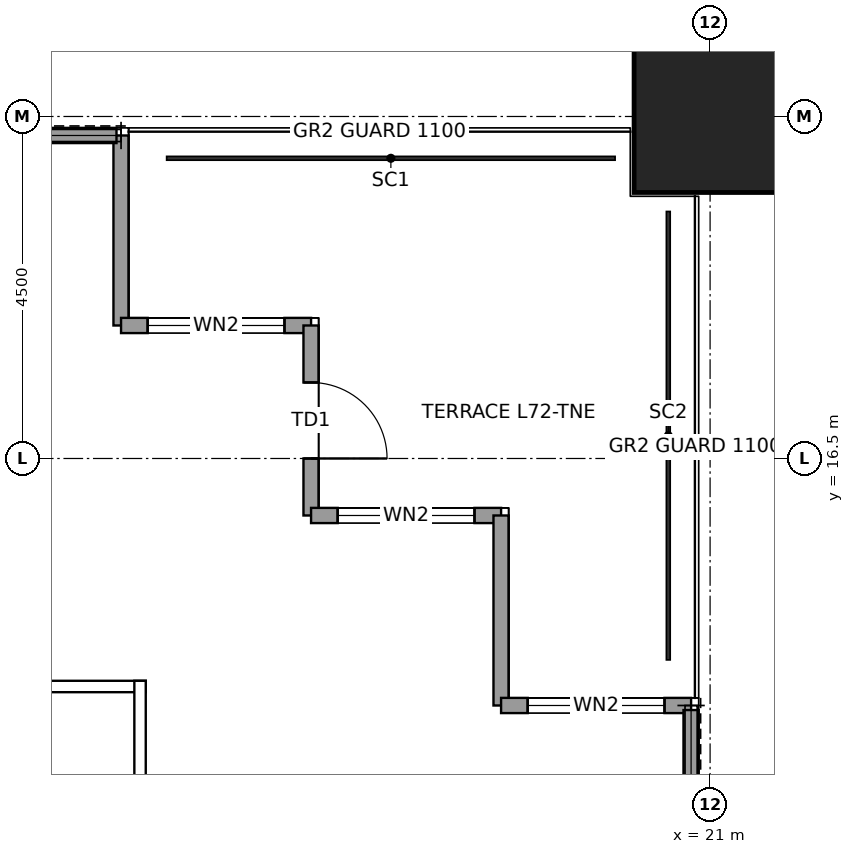
"""IFC4 building model, lengths in metres.
Left out: names, types, materials, properties, quantities, classifications, styles, units other than length and angle.
Written with IfcOpenShell. Run it as: python <this file> out.ifc"""

import sys

from ifc_helpers import new_model, si_unit, direction, frame, frame_2d, origin, origin_2d, place, context, subcontext, project, spatial, rectangle, hollow_rectangle, extrude, element, fill, save


model = new_model("IFC4")
c1 = context("Model", 3, precision=1e-05, world=origin(), true_north=direction((0.0, 1.0)))
c2 = subcontext(c1, "Body", "Model", "MODEL_VIEW")
j1 = project(units=[si_unit("LENGTHUNIT", "METRE"), si_unit("PLANEANGLEUNIT", "RADIAN")], contexts=[c1])
p1 = place(None, origin())
s1 = spatial("IfcSite", under=j1, at=p1, CompositionType="ELEMENT")
p2 = place(p1, origin())
s2 = spatial("IfcBuilding", under=s1, at=p2, CompositionType="ELEMENT")
p3 = place(p2, frame((0.0, 0.0, 323.9)))
s3 = spatial("IfcBuildingStorey", under=s2, at=p3, CompositionType="ELEMENT", Elevation=323.9)
p4 = place(p3, frame((21.0, 21.0, 0.0), z_axis=(0.0, 0.0, 1.0), x_axis=(1.0, 0.0, 0.0)))
e1 = element("IfcColumn", 1, at=p4, inside=s3, PredefinedType="COLUMN", context=c2, shape_type="SweptSolid", body=[
    extrude(hollow_rectangle(XDim=2.0, YDim=2.0, WallThickness=0.095, at=origin_2d()), origin(), (0.0, 0.0, 1.0), 4.0),
])
p5 = place(p3, frame((13.25, 20.75, 0.0), z_axis=(0.0, 0.0, 1.0), x_axis=(0.0, -1.0, 0.0)))
e2 = element("IfcWall", 2, at=p5, inside=s3, PredefinedType="SOLIDWALL", context=c2, shape_type="SweptSolid", body=[
    extrude(rectangle(XDim=2.5, YDim=0.2, at=frame_2d((1.25, 0.0))), origin(), (0.0, 0.0, 1.0), 3.85),
])
p6 = place(p3, frame((13.25, 18.25, 0.0), z_axis=(0.0, 0.0, 1.0), x_axis=(1.0, 0.0, 0.0)))
e3 = element("IfcWall", 3, at=p6, inside=s3, PredefinedType="SOLIDWALL", context=c2, shape_type="SweptSolid", body=[
    extrude(rectangle(XDim=2.5, YDim=0.2, at=frame_2d((1.25, 0.0))), origin(), (0.0, 0.0, 1.0), 3.85),
])
p7 = place(p6, frame((0.35, 0.0, 0.3)))
e4 = element("IfcOpeningElement", 4, at=p7, cuts=e3, PredefinedType="OPENING", context=c2, shape_type="SweptSolid", body=[
    extrude(rectangle(XDim=1.8, YDim=2.4, at=frame_2d((0.9, 1.2))), frame((0.0, 0.11, 0.0), z_axis=(0.0, -1.0, 0.0), x_axis=(1.0, 0.0, 0.0)), (0.0, 0.0, 1.0), 0.22),
])
p8 = place(p3, frame((15.75, 18.25, 0.0), z_axis=(0.0, 0.0, 1.0), x_axis=(0.0, -1.0, 0.0)))
e5 = element("IfcWall", 5, at=p8, inside=s3, PredefinedType="SOLIDWALL", context=c2, shape_type="SweptSolid", body=[
    extrude(rectangle(XDim=2.5, YDim=0.2, at=frame_2d((1.25, 0.0))), origin(), (0.0, 0.0, 1.0), 3.317),
])
p9 = place(p8, frame((0.75, 0.0, 0.0)))
e6 = element("IfcOpeningElement", 6, at=p9, cuts=e5, PredefinedType="OPENING", context=c2, shape_type="SweptSolid", body=[
    extrude(rectangle(XDim=1.0, YDim=2.4, at=frame_2d((0.5, 1.2))), frame((0.0, 0.11, 0.0), z_axis=(0.0, -1.0, 0.0), x_axis=(1.0, 0.0, 0.0)), (0.0, 0.0, 1.0), 0.22),
])
p10 = place(p3, frame((15.75, 15.75, 0.0), z_axis=(0.0, 0.0, 1.0), x_axis=(1.0, 0.0, 0.0)))
e7 = element("IfcWall", 7, at=p10, inside=s3, PredefinedType="SOLIDWALL", context=c2, shape_type="SweptSolid", body=[
    extrude(rectangle(XDim=2.5, YDim=0.2, at=frame_2d((1.25, 0.0))), origin(), (0.0, 0.0, 1.0), 3.85),
])
p11 = place(p10, frame((0.35, 0.0, 0.3)))
e8 = element("IfcOpeningElement", 8, at=p11, cuts=e7, PredefinedType="OPENING", context=c2, shape_type="SweptSolid", body=[
    extrude(rectangle(XDim=1.8, YDim=2.4, at=frame_2d((0.9, 1.2))), frame((0.0, 0.11, 0.0), z_axis=(0.0, -1.0, 0.0), x_axis=(1.0, 0.0, 0.0)), (0.0, 0.0, 1.0), 0.22),
])
p12 = place(p3, frame((18.25, 15.75, 0.0), z_axis=(0.0, 0.0, 1.0), x_axis=(0.0, -1.0, 0.0)))
e9 = element("IfcWall", 9, at=p12, inside=s3, PredefinedType="SOLIDWALL", context=c2, shape_type="SweptSolid", body=[
    extrude(rectangle(XDim=2.5, YDim=0.2, at=frame_2d((1.25, 0.0))), origin(), (0.0, 0.0, 1.0), 3.85),
])
p13 = place(p3, frame((18.25, 13.25, 0.0), z_axis=(0.0, 0.0, 1.0), x_axis=(1.0, 0.0, 0.0)))
e10 = element("IfcWall", 10, at=p13, inside=s3, PredefinedType="SOLIDWALL", context=c2, shape_type="SweptSolid", body=[
    extrude(rectangle(XDim=2.5, YDim=0.2, at=frame_2d((1.25, 0.0))), origin(), (0.0, 0.0, 1.0), 3.85),
])
p14 = place(p13, frame((0.35, 0.0, 0.3)))
e11 = element("IfcOpeningElement", 11, at=p14, cuts=e10, PredefinedType="OPENING", context=c2, shape_type="SweptSolid", body=[
    extrude(rectangle(XDim=1.8, YDim=2.4, at=frame_2d((0.9, 1.2))), frame((0.0, 0.11, 0.0), z_axis=(0.0, -1.0, 0.0), x_axis=(1.0, 0.0, 0.0)), (0.0, 0.0, 1.0), 0.22),
])
for number, where, z_axis, x_axis in (
    (12, (10.405, 20.75, 0.0), (0.0, 0.0, 1.0), (1.0, 0.0, 0.0)),
    (13, (20.75, 13.19, 0.0), (0.0, 0.0, 1.0), (0.0, -1.0, 0.0)),
):
    element("IfcWall", number, at=place(p3, frame(where, z_axis=z_axis, x_axis=x_axis)), inside=s3, PredefinedType="SOLIDWALL", context=c2, shape_type="SweptSolid", body=[
        extrude(rectangle(XDim=2.785, YDim=0.2, at=frame_2d((1.393, 0.0))), origin(), (0.0, 0.0, 1.0), 3.85),
    ])
p15 = place(p3, frame((4.925, 13.5, 0.0), z_axis=(0.0, 0.0, 1.0), x_axis=(1.0, 0.0, 0.0)))
e14 = element("IfcWall", 14, at=p15, inside=s3, PredefinedType="PARTITIONING", context=c2, shape_type="SweptSolid", body=[
    extrude(rectangle(XDim=8.65, YDim=0.15, at=frame_2d((4.325, 0.0))), origin(), (0.0, 0.0, 1.0), 3.85),
])
p16 = place(p3, frame((13.5, 4.925, 0.0), z_axis=(0.0, 0.0, 1.0), x_axis=(0.0, 1.0, 0.0)))
e15 = element("IfcWall", 15, at=p16, inside=s3, PredefinedType="PARTITIONING", context=c2, shape_type="SweptSolid", body=[
    extrude(rectangle(XDim=8.65, YDim=0.15, at=frame_2d((4.325, 0.0))), origin(), (0.0, 0.0, 1.0), 3.85),
])
p17 = place(p16, frame((3.825, 0.0, 0.0)))
e16 = element("IfcOpeningElement", 16, at=p17, cuts=e15, PredefinedType="OPENING", context=c2, shape_type="SweptSolid", body=[
    extrude(rectangle(XDim=1.0, YDim=2.4, at=frame_2d((0.5, 1.2))), frame((0.0, 0.085, 0.0), z_axis=(0.0, -1.0, 0.0), x_axis=(1.0, 0.0, 0.0)), (0.0, 0.0, 1.0), 0.17),
])
p18 = place(p7, origin())
e17 = element("IfcWindow", 17, at=p18, inside=s3, PartitioningType="SINGLE_PANEL", PredefinedType="WINDOW", context=c2, shape_type="SweptSolid", body=[
    extrude(rectangle(XDim=1.8, YDim=2.4, at=frame_2d((0.9, 1.2))), frame((0.0, 0.03, 0.0), z_axis=(0.0, -1.0, 0.0), x_axis=(1.0, 0.0, 0.0)), (0.0, 0.0, 1.0), 0.06),
])
fill(e4, e17)
p19 = place(p9, origin())
e18 = element("IfcDoor", 18, at=p19, inside=s3, OperationType="SINGLE_SWING_RIGHT", PredefinedType="DOOR", context=c2, shape_type="SweptSolid", body=[
    extrude(rectangle(XDim=1.0, YDim=2.4, at=frame_2d((0.5, 1.2))), frame((0.0, 0.025, 0.0), z_axis=(0.0, -1.0, 0.0), x_axis=(1.0, 0.0, 0.0)), (0.0, 0.0, 1.0), 0.05),
])
fill(e6, e18)
p20 = place(p11, origin())
e19 = element("IfcWindow", 19, at=p20, inside=s3, PartitioningType="SINGLE_PANEL", PredefinedType="WINDOW", context=c2, shape_type="SweptSolid", body=[
    extrude(rectangle(XDim=1.8, YDim=2.4, at=frame_2d((0.9, 1.2))), frame((0.0, 0.03, 0.0), z_axis=(0.0, -1.0, 0.0), x_axis=(1.0, 0.0, 0.0)), (0.0, 0.0, 1.0), 0.06),
])
fill(e8, e19)
p21 = place(p14, origin())
e20 = element("IfcWindow", 20, at=p21, inside=s3, PartitioningType="SINGLE_PANEL", PredefinedType="WINDOW", context=c2, shape_type="SweptSolid", body=[
    extrude(rectangle(XDim=1.8, YDim=2.4, at=frame_2d((0.9, 1.2))), frame((0.0, 0.03, 0.0), z_axis=(0.0, -1.0, 0.0), x_axis=(1.0, 0.0, 0.0)), (0.0, 0.0, 1.0), 0.06),
])
fill(e11, e20)
save(model, sys.argv[1])
